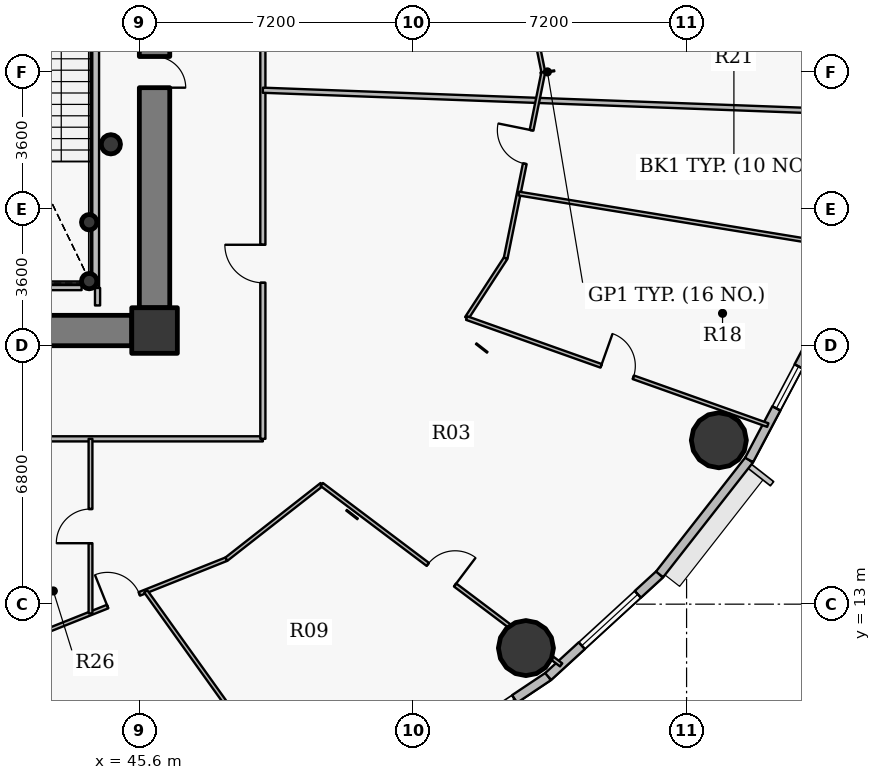
"""IFC4 building model, lengths in metres.
Left out: names, types, materials, properties, quantities, classifications, styles, units other than length and angle.
Written with IfcOpenShell. Run it as: python <this file> out.ifc"""

import sys

from ifc_helpers import new_model, si_unit, direction, frame, frame_2d, origin, origin_2d, place, context, subcontext, project, spatial, rectangle, hollow_circle, extrude, source, transform, mapped, element, fill, save


model = new_model("IFC4")
c1 = context("Model", 3, precision=1e-05, world=origin(), true_north=direction((0.0, 1.0)))
c2 = subcontext(c1, "Body", "Model", "MODEL_VIEW")
j1 = project(units=[si_unit("LENGTHUNIT", "METRE"), si_unit("PLANEANGLEUNIT", "RADIAN")], contexts=[c1])
p1 = place(None, origin())
s1 = spatial("IfcSite", under=j1, at=p1, CompositionType="ELEMENT")
p2 = place(p1, origin())
s2 = spatial("IfcBuilding", under=s1, at=p2, CompositionType="ELEMENT")
p3 = place(p2, frame((0.0, 0.0, 112.2)))
s3 = spatial("IfcBuildingStorey", under=s2, at=p3, CompositionType="ELEMENT", Elevation=112.2)
p4 = place(p3, frame((46.0, 20.2, 0.0), z_axis=(0.0, 0.0, 1.0), x_axis=(1.0, 0.0, 0.0)))
e1 = element("IfcColumn", 1, at=p4, inside=s3, PredefinedType="COLUMN", context=c2, shape_type="SweptSolid", body=[
    extrude(rectangle(XDim=1.2, YDim=1.2, at=origin_2d()), origin(), (0.0, 0.0, 1.0), 3.75),
])
for number, where, z_axis, x_axis in (
    (2, (44.28, 21.5, 0.0), (0.0, 0.0, 1.0), (1.0, 0.0, 0.0)),
    (3, (44.28, 23.05, 0.0), (0.0, 0.0, 1.0), (1.0, 0.0, 0.0)),
):
    element("IfcColumn", number, at=place(p3, frame(where, z_axis=z_axis, x_axis=x_axis)), inside=s3, PredefinedType="COLUMN", context=c2, shape_type="SweptSolid", body=[
        extrude(hollow_circle(Radius=0.203, WallThickness=0.016, at=origin_2d()), origin(), (0.0, 0.0, 1.0), 3.75),
    ])
p5 = place(p3, frame((46.0, 33.2, 0.0), z_axis=(0.0, 0.0, 1.0), x_axis=(0.0, -1.0, 0.0)))
e4 = element("IfcWall", 4, at=p5, inside=s3, PredefinedType="SHEAR", context=c2, shape_type="SweptSolid", body=[
    extrude(rectangle(XDim=12.4, YDim=0.8, at=frame_2d((6.2, 0.0))), origin(), (0.0, 0.0, 1.0), 2.95),
])
p6 = place(p5, frame((5.79, 0.0, 0.0)))
e5 = element("IfcOpeningElement", 5, at=p6, cuts=e4, PredefinedType="OPENING", context=c2, shape_type="SweptSolid", body=[
    extrude(rectangle(XDim=0.82, YDim=2.1, at=origin_2d()), frame((0.41, 0.41, 1.05), z_axis=(0.0, -1.0, 0.0), x_axis=(1.0, 0.0, 0.0)), (0.0, 0.0, 1.0), 0.82),
])
p7 = place(p3, frame((45.4, 20.2, 0.0), z_axis=(0.0, 0.0, 1.0), x_axis=(-1.0, 0.0, 0.0)))
e6 = element("IfcWall", 6, at=p7, inside=s3, PredefinedType="SHEAR", context=c2, shape_type="SweptSolid", body=[
    extrude(rectangle(XDim=18.8, YDim=0.8, at=frame_2d((9.4, 0.0))), origin(), (0.0, 0.0, 1.0), 2.95),
])
p8 = place(p7, frame((10.15, 0.0, 0.0)))
e7 = element("IfcOpeningElement", 7, at=p8, cuts=e6, PredefinedType="OPENING", context=c2, shape_type="SweptSolid", body=[
    extrude(rectangle(XDim=1.15, YDim=2.15, at=origin_2d()), frame((0.575, 0.41, 1.075), z_axis=(0.0, -1.0, 0.0), x_axis=(1.0, 0.0, 0.0)), (0.0, 0.0, 1.0), 0.82),
])
for number, where, z_axis, x_axis in (
    (8, (55.773, 11.844, 0.0), (0.0, 0.0, 1.0), (1.0, 0.0, 0.0)),
    (9, (60.849, 17.312, 0.0), (0.0, 0.0, 1.0), (1.0, 0.0, 0.0)),
):
    element("IfcColumn", number, at=place(p3, frame(where, z_axis=z_axis, x_axis=x_axis)), inside=s3, PredefinedType="COLUMN", context=c2, shape_type="SweptSolid", body=[
        extrude(hollow_circle(Radius=0.725, WallThickness=0.042, at=origin_2d()), origin(), (0.0, 0.0, 1.0), 3.75),
    ])
p9 = place(p3, frame((44.85, 25.1, 0.0), z_axis=(0.0, 0.0, 1.0), x_axis=(1.0, 0.0, 0.0)))
e10 = element("IfcColumn", 10, at=p9, inside=s3, PredefinedType="COLUMN", context=c2, shape_type="SweptSolid", body=[
    extrude(hollow_circle(Radius=0.254, WallThickness=0.02, at=origin_2d()), origin(), (0.0, 0.0, 1.0), 3.75),
])
p10 = place(p3, frame((56.358, 11.097, 0.0), z_axis=(0.0, 0.0, 1.0), x_axis=(-0.831221811447, -0.555940914284, 0.0)))
e11 = element("IfcWall", 11, at=p10, inside=s3, PredefinedType="SOLIDWALL", context=c2, shape_type="SweptSolid", body=[
    extrude(rectangle(XDim=4.13, YDim=0.24, at=frame_2d((2.065, 0.0))), origin(), (0.0, 0.0, 1.0), 3.5),
])
p11 = place(p10, frame((1.065, 0.0, 0.9)))
e12 = element("IfcOpeningElement", 12, at=p11, cuts=e11, PredefinedType="OPENING", context=c2, shape_type="SweptSolid", body=[
    extrude(rectangle(XDim=2.0, YDim=1.75, at=origin_2d()), frame((1.0, 0.13, 0.875), z_axis=(0.0, -1.0, 0.0), x_axis=(1.0, 0.0, 0.0)), (0.0, 0.0, 1.0), 0.26),
])
p12 = place(p3, frame((59.289, 13.783, 0.0), z_axis=(0.0, 0.0, 1.0), x_axis=(-0.737113356241, -0.675769117414, 0.0)))
e13 = element("IfcWall", 13, at=p12, inside=s3, PredefinedType="SOLIDWALL", context=c2, shape_type="SweptSolid", body=[
    extrude(rectangle(XDim=3.976, YDim=0.24, at=frame_2d((1.988, 0.0))), origin(), (0.0, 0.0, 1.0), 3.5),
])
p13 = place(p12, frame((0.776, 0.0, 0.9)))
e14 = element("IfcOpeningElement", 14, at=p13, cuts=e13, PredefinedType="OPENING", context=c2, shape_type="SweptSolid", body=[
    extrude(rectangle(XDim=2.0, YDim=1.75, at=origin_2d()), frame((1.0, 0.13, 0.875), z_axis=(0.0, -1.0, 0.0), x_axis=(1.0, 0.0, 0.0)), (0.0, 0.0, 1.0), 0.26),
])
p14 = place(p3, frame((61.645, 16.794, 0.0), z_axis=(0.0, 0.0, 1.0), x_axis=(-0.616272103517, -0.787533297345, 0.0)))
e15 = element("IfcWall", 15, at=p14, inside=s3, PredefinedType="SOLIDWALL", context=c2, shape_type="SweptSolid", body=[
    extrude(rectangle(XDim=3.823, YDim=0.24, at=frame_2d((1.912, 0.0))), origin(), (0.0, 0.0, 1.0), 3.5),
])
p15 = place(p3, frame((63.37, 20.055, 0.0), z_axis=(0.0, 0.0, 1.0), x_axis=(-0.467614004126, -0.883932770716, 0.0)))
e16 = element("IfcWall", 16, at=p15, inside=s3, PredefinedType="SOLIDWALL", context=c2, shape_type="SweptSolid", body=[
    extrude(rectangle(XDim=3.689, YDim=0.24, at=frame_2d((1.844, 0.0))), origin(), (0.0, 0.0, 1.0), 3.5),
])
p16 = place(p15, frame((0.904, 0.0, 0.9)))
e17 = element("IfcOpeningElement", 17, at=p16, cuts=e16, PredefinedType="OPENING", context=c2, shape_type="SweptSolid", body=[
    extrude(rectangle(XDim=1.25, YDim=1.65, at=origin_2d()), frame((0.625, 0.13, 0.825), z_axis=(0.0, -1.0, 0.0), x_axis=(1.0, 0.0, 0.0)), (0.0, 0.0, 1.0), 0.26),
])
p17 = place(p3, frame((38.477, 17.35, 0.0), z_axis=(0.0, 0.0, 1.0), x_axis=(1.0, 0.0, 0.0)))
e18 = element("IfcWall", 18, at=p17, inside=s3, PredefinedType="PARTITIONING", context=c2, shape_type="SweptSolid", body=[
    extrude(rectangle(XDim=10.373, YDim=0.135, at=frame_2d((5.187, 0.0))), origin(), (0.0, 0.0, 1.0), 2.935),
])
p18 = place(p3, frame((42.251, 11.934, 0.0), z_axis=(0.0, 0.0, 1.0), x_axis=(0.928803554156, 0.370572473055, 0.0)))
e19 = element("IfcWall", 19, at=p18, inside=s3, PredefinedType="PARTITIONING", context=c2, shape_type="SweptSolid", body=[
    extrude(rectangle(XDim=6.072, YDim=0.1, at=frame_2d((3.036, 0.0))), origin(), (0.0, 0.0, 1.0), 2.935),
])
p19 = place(p18, frame((2.705, 0.0, 0.0)))
e20 = element("IfcOpeningElement", 20, at=p19, cuts=e19, PredefinedType="OPENING", context=c2, shape_type="SweptSolid", body=[
    extrude(rectangle(XDim=0.9, YDim=2.1, at=origin_2d()), frame((0.45, 0.06, 1.05), z_axis=(0.0, -1.0, 0.0), x_axis=(1.0, 0.0, 0.0)), (0.0, 0.0, 1.0), 0.12),
])
p20 = place(p3, frame((44.315, 12.758, 0.0), z_axis=(0.0, 0.0, 1.0), x_axis=(0.0, 1.0, 0.0)))
e21 = element("IfcWall", 21, at=p20, inside=s3, PredefinedType="PARTITIONING", context=c2, shape_type="SweptSolid", body=[
    extrude(rectangle(XDim=4.593, YDim=0.1, at=frame_2d((2.296, 0.0))), origin(), (0.0, 0.0, 1.0), 3.5),
])
p21 = place(p20, frame((1.846, 0.0, 0.0)))
e22 = element("IfcOpeningElement", 22, at=p21, cuts=e21, PredefinedType="OPENING", context=c2, shape_type="SweptSolid", body=[
    extrude(rectangle(XDim=0.9, YDim=2.1, at=origin_2d()), frame((0.45, 0.06, 1.05), z_axis=(0.0, -1.0, 0.0), x_axis=(1.0, 0.0, 0.0)), (0.0, 0.0, 1.0), 0.12),
])
p22 = place(p3, frame((44.44, 21.33, 0.0), z_axis=(0.0, 0.0, 1.0), x_axis=(0.0, 1.0, 0.0)))
e23 = element("IfcWall", 23, at=p22, inside=s3, PredefinedType="PARTITIONING", context=c2, shape_type="SweptSolid", body=[
    extrude(rectangle(XDim=8.52, YDim=0.2, at=frame_2d((4.26, 0.0))), origin(), (0.0, 0.0, 1.0), 3.5),
])
p23 = place(p3, frame((45.768, 13.337, 0.0), z_axis=(0.0, 0.0, 1.0), x_axis=(0.581582931767, -0.813487119429, 0.0)))
e24 = element("IfcWall", 24, at=p23, inside=s3, PredefinedType="PARTITIONING", context=c2, shape_type="SweptSolid", body=[
    extrude(rectangle(XDim=7.301, YDim=0.1, at=frame_2d((3.65, 0.0))), origin(), (0.0, 0.0, 1.0), 2.935),
])
p24 = place(p3, frame((47.891, 14.184, 0.0), z_axis=(0.0, 0.0, 1.0), x_axis=(0.787351391371, 0.616504490256, 0.0)))
e25 = element("IfcWall", 25, at=p24, inside=s3, PredefinedType="PARTITIONING", context=c2, shape_type="SweptSolid", body=[
    extrude(rectangle(XDim=3.187, YDim=0.1, at=frame_2d((1.593, 0.0))), origin(), (0.0, 0.0, 1.0), 2.935),
])
p25 = place(p3, frame((48.85, 17.35, 0.0), z_axis=(0.0, 0.0, 1.0), x_axis=(0.0, 1.0, 0.0)))
e26 = element("IfcWall", 26, at=p25, inside=s3, PredefinedType="PARTITIONING", context=c2, shape_type="SweptSolid", body=[
    extrude(rectangle(XDim=19.3, YDim=0.135, at=frame_2d((9.65, 0.0))), origin(), (0.0, 0.0, 1.0), 2.935),
])
p26 = place(p25, frame((4.107, 0.0, 0.0)))
e27 = element("IfcOpeningElement", 27, at=p26, cuts=e26, PredefinedType="OPENING", context=c2, shape_type="SweptSolid", body=[
    extrude(rectangle(XDim=1.0, YDim=2.15, at=origin_2d()), frame((0.5, 0.078, 1.075), z_axis=(0.0, -1.0, 0.0), x_axis=(1.0, 0.0, 0.0)), (0.0, 0.0, 1.0), 0.155),
])
p27 = place(p25, frame((13.717, 0.0, 0.0)))
e28 = element("IfcOpeningElement", 28, at=p27, cuts=e26, PredefinedType="OPENING", context=c2, shape_type="SweptSolid", body=[
    extrude(rectangle(XDim=1.0, YDim=2.15, at=origin_2d()), frame((0.5, 0.078, 1.075), z_axis=(0.0, -1.0, 0.0), x_axis=(1.0, 0.0, 0.0)), (0.0, 0.0, 1.0), 0.155),
])
p28 = place(p3, frame((48.85, 26.523, 0.0), z_axis=(0.0, 0.0, 1.0), x_axis=(0.999312212169, -0.03708237599, 0.0)))
e29 = element("IfcWall", 29, at=p28, inside=s3, PredefinedType="PARTITIONING", context=c2, shape_type="SweptSolid", body=[
    extrude(rectangle(XDim=15.834, YDim=0.135, at=frame_2d((7.917, 0.0))), origin(), (0.0, 0.0, 1.0), 2.935),
])
p29 = place(p3, frame((50.4, 16.149, 0.0), z_axis=(0.0, 0.0, 1.0), x_axis=(0.79862729849, -0.601825920102, 0.0)))
e30 = element("IfcWall", 30, at=p29, inside=s3, PredefinedType="PARTITIONING", context=c2, shape_type="SweptSolid", body=[
    extrude(rectangle(XDim=7.887, YDim=0.1, at=frame_2d((3.944, 0.0))), origin(), (0.0, 0.0, 1.0), 2.935),
])
p30 = place(p29, frame((3.494, 0.0, 0.0)))
e31 = element("IfcOpeningElement", 31, at=p30, cuts=e30, PredefinedType="OPENING", context=c2, shape_type="SweptSolid", body=[
    extrude(rectangle(XDim=0.9, YDim=2.1, at=origin_2d()), frame((0.45, 0.06, 1.05), z_axis=(0.0, -1.0, 0.0), x_axis=(1.0, 0.0, 0.0)), (0.0, 0.0, 1.0), 0.12),
])
p31 = place(p3, frame((54.214, 20.528, 0.0), z_axis=(0.0, 0.0, 1.0), x_axis=(0.545444312607, 0.838147064568, 0.0)))
e32 = element("IfcWall", 32, at=p31, inside=s3, PredefinedType="PARTITIONING", context=c2, shape_type="SweptSolid", body=[
    extrude(rectangle(XDim=1.882, YDim=0.1, at=frame_2d((0.941, 0.0))), origin(), (0.0, 0.0, 1.0), 3.5),
])
p32 = place(p3, frame((54.214, 20.528, 0.0), z_axis=(0.0, 0.0, 1.0), x_axis=(0.942277402903, -0.334833236073, 0.0)))
e33 = element("IfcWall", 33, at=p32, inside=s3, PredefinedType="PARTITIONING", context=c2, shape_type="SweptSolid", body=[
    extrude(rectangle(XDim=8.408, YDim=0.1, at=frame_2d((4.204, 0.0))), origin(), (0.0, 0.0, 1.0), 2.935),
])
p33 = place(p32, frame((3.754, 0.0, 0.0)))
e34 = element("IfcOpeningElement", 34, at=p33, cuts=e33, PredefinedType="OPENING", context=c2, shape_type="SweptSolid", body=[
    extrude(rectangle(XDim=0.9, YDim=2.1, at=origin_2d()), frame((0.45, 0.06, 1.05), z_axis=(0.0, -1.0, 0.0), x_axis=(1.0, 0.0, 0.0)), (0.0, 0.0, 1.0), 0.12),
])
p34 = place(p3, frame((55.24, 22.105, 0.0), z_axis=(0.0, 0.0, 1.0), x_axis=(0.198230919145, 0.980155346205, 0.0)))
e35 = element("IfcWall", 35, at=p34, inside=s3, PredefinedType="PARTITIONING", context=c2, shape_type="SweptSolid", body=[
    extrude(rectangle(XDim=4.994, YDim=0.1, at=frame_2d((2.497, 0.0))), origin(), (0.0, 0.0, 1.0), 2.935),
])
p35 = place(p34, frame((2.534, 0.0, 0.0)))
e36 = element("IfcOpeningElement", 36, at=p35, cuts=e35, PredefinedType="OPENING", context=c2, shape_type="SweptSolid", body=[
    extrude(rectangle(XDim=0.9, YDim=2.1, at=origin_2d()), frame((0.45, 0.06, 1.05), z_axis=(0.0, -1.0, 0.0), x_axis=(1.0, 0.0, 0.0)), (0.0, 0.0, 1.0), 0.12),
])
p36 = place(p3, frame((55.24, 31.895, 0.0), z_axis=(0.0, 0.0, 1.0), x_axis=(0.19822142127, -0.980157267049, 0.0)))
e37 = element("IfcWall", 37, at=p36, inside=s3, PredefinedType="PARTITIONING", context=c2, shape_type="SweptSolid", body=[
    extrude(rectangle(XDim=4.994, YDim=0.1, at=frame_2d((2.497, 0.0))), origin(), (0.0, 0.0, 1.0), 2.935),
])
p37 = place(p36, frame((3.045, 0.0, 0.0)))
e38 = element("IfcOpeningElement", 38, at=p37, cuts=e37, PredefinedType="OPENING", context=c2, shape_type="SweptSolid", body=[
    extrude(rectangle(XDim=0.9, YDim=2.1, at=origin_2d()), frame((0.45, 0.06, 1.05), z_axis=(0.0, -1.0, 0.0), x_axis=(1.0, 0.0, 0.0)), (0.0, 0.0, 1.0), 0.12),
])
p38 = place(p3, frame((55.583, 23.804, 0.0), z_axis=(0.0, 0.0, 1.0), x_axis=(0.986943531615, -0.161066648946, 0.0)))
e39 = element("IfcWall", 39, at=p38, inside=s3, PredefinedType="PARTITIONING", context=c2, shape_type="SweptSolid", body=[
    extrude(rectangle(XDim=8.628, YDim=0.1, at=frame_2d((4.314, 0.0))), origin(), (0.0, 0.0, 1.0), 2.935),
])
p39 = place(p3, frame((44.08, 21.33, 0.0), z_axis=(0.0, 0.0, 1.0), x_axis=(-1.0, 0.0, 0.0)))
e40 = element("IfcWall", 40, at=p39, inside=s3, PredefinedType="PARTITIONING", context=c2, shape_type="SweptSolid", body=[
    extrude(rectangle(XDim=2.82, YDim=0.135, at=frame_2d((1.41, 0.0))), origin(), (0.0, 0.0, 1.0), 3.035),
])
p40 = place(p3, frame((44.5, 20.86, 0.0), z_axis=(0.0, 0.0, 1.0), x_axis=(0.0, 1.0, 0.0)))
e41 = element("IfcWall", 41, at=p40, inside=s3, PredefinedType="PARTITIONING", context=c2, shape_type="SweptSolid", body=[
    extrude(rectangle(XDim=0.46, YDim=0.135, at=frame_2d((0.23, 0.0))), origin(), (0.0, 0.0, 1.0), 3.5),
])
p41 = place(p3, frame((45.41, 19.8, 0.0), z_axis=(0.0, 0.0, 1.0), x_axis=(1.0, 0.0, 0.0)))
e42 = element("IfcWall", 42, at=p41, inside=s3, PredefinedType="PARTITIONING", context=c2, shape_type="SweptSolid", body=[
    extrude(rectangle(XDim=0.99, YDim=0.135, at=frame_2d((0.495, 0.0))), origin(), (0.0, 0.0, 1.0), 2.935),
])
p42 = place(p3, frame((46.4, 20.107, 0.0), z_axis=(0.0, 0.0, 1.0), x_axis=(0.0, 1.0, 0.0)))
e43 = element("IfcWall", 43, at=p42, inside=s3, PredefinedType="PARTITIONING", context=c2, shape_type="SweptSolid", body=[
    extrude(rectangle(XDim=0.683, YDim=0.135, at=frame_2d((0.341, 0.0))), origin(), (0.0, 0.0, 1.0), 3.5),
])
m1 = source(origin(), c2, "Body", "SweptSolid", [
    extrude(rectangle(XDim=2.0, YDim=1.75, at=origin_2d()), frame((1.0, 0.03, 0.875), z_axis=(0.0, -1.0, 0.0), x_axis=(1.0, 0.0, 0.0)), (0.0, 0.0, 1.0), 0.06),
])
p43 = place(p11, origin())
e44 = element("IfcWindow", 44, at=p43, inside=s3, PartitioningType="DOUBLE_PANEL_VERTICAL", PredefinedType="WINDOW", context=c2, shape_type="MappedRepresentation", body=[
    mapped(m1, transform((0.0, 0.0, 0.0), x_axis=(1.0, 0.0, 0.0), y_axis=(0.0, 1.0, 0.0), z_axis=(0.0, 0.0, 1.0), scale=1.0)),
])
fill(e12, e44)
p44 = place(p13, origin())
e45 = element("IfcWindow", 45, at=p44, inside=s3, PartitioningType="DOUBLE_PANEL_VERTICAL", PredefinedType="WINDOW", context=c2, shape_type="MappedRepresentation", body=[
    mapped(m1, transform((0.0, 0.0, 0.0), x_axis=(1.0, 0.0, 0.0), y_axis=(0.0, 1.0, 0.0), z_axis=(0.0, 0.0, 1.0), scale=1.0)),
])
fill(e14, e45)
m2 = source(origin(), c2, "Body", "SweptSolid", [
    extrude(rectangle(XDim=1.25, YDim=1.65, at=origin_2d()), frame((0.625, 0.03, 0.825), z_axis=(0.0, -1.0, 0.0), x_axis=(1.0, 0.0, 0.0)), (0.0, 0.0, 1.0), 0.06),
])
p45 = place(p16, origin())
e46 = element("IfcWindow", 46, at=p45, inside=s3, PartitioningType="SINGLE_PANEL", PredefinedType="WINDOW", context=c2, shape_type="MappedRepresentation", body=[
    mapped(m2, transform((0.0, 0.0, 0.0), x_axis=(1.0, 0.0, 0.0), y_axis=(0.0, 1.0, 0.0), z_axis=(0.0, 0.0, 1.0), scale=1.0)),
])
fill(e17, e46)
m3 = source(origin(), c2, "Body", "SweptSolid", [
    extrude(rectangle(XDim=0.82, YDim=2.1, at=origin_2d()), frame((0.41, 0.025, 1.05), z_axis=(0.0, -1.0, 0.0), x_axis=(1.0, 0.0, 0.0)), (0.0, 0.0, 1.0), 0.05),
])
p46 = place(p6, origin())
e47 = element("IfcDoor", 47, at=p46, inside=s3, OperationType="SINGLE_SWING_RIGHT", PredefinedType="DOOR", context=c2, shape_type="MappedRepresentation", body=[
    mapped(m3, transform((0.0, 0.0, 0.0), x_axis=(1.0, 0.0, 0.0), y_axis=(0.0, 1.0, 0.0), z_axis=(0.0, 0.0, 1.0), scale=1.0)),
])
fill(e5, e47)
m4 = source(origin(), c2, "Body", "SweptSolid", [
    extrude(rectangle(XDim=1.0, YDim=2.15, at=origin_2d()), frame((0.5, 0.025, 1.075), z_axis=(0.0, -1.0, 0.0), x_axis=(1.0, 0.0, 0.0)), (0.0, 0.0, 1.0), 0.05),
])
p47 = place(p26, origin())
e48 = element("IfcDoor", 48, at=p47, inside=s3, OperationType="SINGLE_SWING_RIGHT", PredefinedType="DOOR", context=c2, shape_type="MappedRepresentation", body=[
    mapped(m4, transform((0.0, 0.0, 0.0), x_axis=(1.0, 0.0, 0.0), y_axis=(0.0, 1.0, 0.0), z_axis=(0.0, 0.0, 1.0), scale=1.0)),
])
fill(e27, e48)
m5 = source(origin(), c2, "Body", "SweptSolid", [
    extrude(rectangle(XDim=0.9, YDim=2.1, at=origin_2d()), frame((0.45, 0.025, 1.05), z_axis=(0.0, -1.0, 0.0), x_axis=(1.0, 0.0, 0.0)), (0.0, 0.0, 1.0), 0.05),
])
p48 = place(p19, origin())
e49 = element("IfcDoor", 49, at=p48, inside=s3, OperationType="SINGLE_SWING_LEFT", PredefinedType="DOOR", context=c2, shape_type="MappedRepresentation", body=[
    mapped(m5, transform((0.0, 0.0, 0.0), x_axis=(1.0, 0.0, 0.0), y_axis=(0.0, 1.0, 0.0), z_axis=(0.0, 0.0, 1.0), scale=1.0)),
])
fill(e20, e49)
p49 = place(p30, origin())
e50 = element("IfcDoor", 50, at=p49, inside=s3, OperationType="SINGLE_SWING_RIGHT", PredefinedType="DOOR", context=c2, shape_type="MappedRepresentation", body=[
    mapped(m5, transform((0.0, 0.0, 0.0), x_axis=(1.0, 0.0, 0.0), y_axis=(0.0, 1.0, 0.0), z_axis=(0.0, 0.0, 1.0), scale=1.0)),
])
fill(e31, e50)
p50 = place(p33, origin())
e51 = element("IfcDoor", 51, at=p50, inside=s3, OperationType="SINGLE_SWING_LEFT", PredefinedType="DOOR", context=c2, shape_type="MappedRepresentation", body=[
    mapped(m5, transform((0.0, 0.0, 0.0), x_axis=(1.0, 0.0, 0.0), y_axis=(0.0, 1.0, 0.0), z_axis=(0.0, 0.0, 1.0), scale=1.0)),
])
fill(e34, e51)
p51 = place(p35, origin())
e52 = element("IfcDoor", 52, at=p51, inside=s3, OperationType="SINGLE_SWING_RIGHT", PredefinedType="DOOR", context=c2, shape_type="MappedRepresentation", body=[
    mapped(m5, transform((0.0, 0.0, 0.0), x_axis=(1.0, 0.0, 0.0), y_axis=(0.0, 1.0, 0.0), z_axis=(0.0, 0.0, 1.0), scale=1.0)),
])
fill(e36, e52)
p52 = place(p21, origin())
e53 = element("IfcDoor", 53, at=p52, inside=s3, OperationType="SINGLE_SWING_LEFT", PredefinedType="DOOR", context=c2, shape_type="MappedRepresentation", body=[
    mapped(m5, transform((0.0, 0.0, 0.0), x_axis=(1.0, 0.0, 0.0), y_axis=(0.0, 1.0, 0.0), z_axis=(0.0, 0.0, 1.0), scale=1.0)),
])
fill(e22, e53)
save(model, sys.argv[1])
